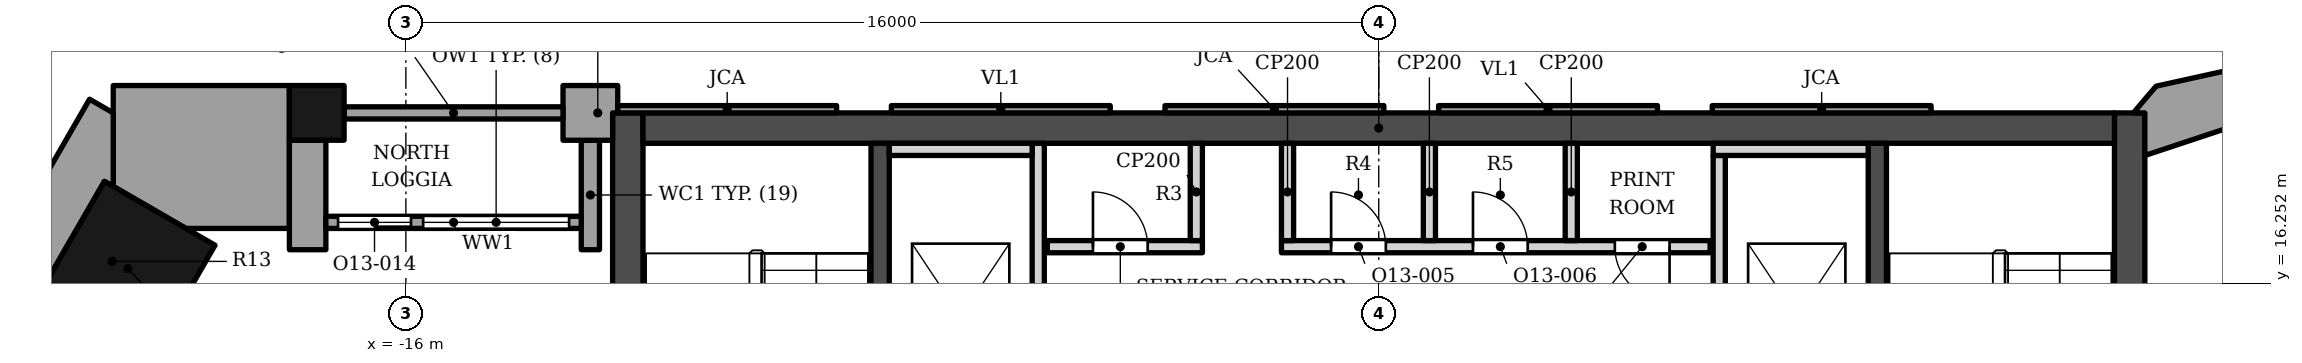
"""IFC4 building model, lengths in metres.
Left out: names, types, materials, properties, quantities, classifications, styles, units other than length and angle.
Written with IfcOpenShell. Run it as: python <this file> out.ifc"""

import sys

from ifc_helpers import new_model, si_unit, direction, frame, frame_2d, origin, origin_2d, place, context, subcontext, project, spatial, polyline, rectangle, outline, extrude, element, fill, save


model = new_model("IFC4")
c1 = context("Model", 3, precision=1e-05, world=origin(), true_north=direction((0.0, 1.0)))
c2 = subcontext(c1, "Body", "Model", "MODEL_VIEW")
j1 = project(units=[si_unit("LENGTHUNIT", "METRE"), si_unit("PLANEANGLEUNIT", "RADIAN")], contexts=[c1])
p1 = place(None, origin())
s1 = spatial("IfcSite", under=j1, at=p1, CompositionType="ELEMENT")
p2 = place(p1, origin())
s2 = spatial("IfcBuilding", under=s1, at=p2, CompositionType="ELEMENT")
p3 = place(p2, frame((0.0, 0.0, 287.2)))
s3 = spatial("IfcBuildingStorey", under=s2, at=p3, CompositionType="ELEMENT", Elevation=287.2)
p4 = place(p3, frame((-12.1, 18.802, 0.0), z_axis=(0.0, 0.0, 1.0), x_axis=(1.0, 0.0, 0.0)))
e1 = element("IfcWall", 1, at=p4, inside=s3, PredefinedType="SHEAR", context=c2, shape_type="SweptSolid", body=[
    extrude(rectangle(XDim=24.2, YDim=0.5, at=frame_2d((12.1, 0.0))), origin(), (0.0, 0.0, 1.0), 3.9),
])
p5 = place(p3, frame((-12.35, 5.253, 0.0), z_axis=(0.0, 0.0, 1.0), x_axis=(0.0, 1.0, 0.0)))
e2 = element("IfcWall", 2, at=p5, inside=s3, PredefinedType="SHEAR", context=c2, shape_type="SweptSolid", body=[
    extrude(rectangle(XDim=13.8, YDim=0.5, at=frame_2d((6.9, 0.0))), origin(), (0.0, 0.0, 1.0), 3.9),
])
p6 = place(p3, frame((-8.2, 5.253, 0.0), z_axis=(0.0, 0.0, 1.0), x_axis=(0.0, 1.0, 0.0)))
e3 = element("IfcWall", 3, at=p6, inside=s3, PredefinedType="SHEAR", context=c2, shape_type="SweptSolid", body=[
    extrude(rectangle(XDim=13.3, YDim=0.3, at=frame_2d((6.65, 0.0))), origin(), (0.0, 0.0, 1.0), 3.9),
])
p7 = place(p6, frame((7.1, 0.0, 0.0)))
e4 = element("IfcOpeningElement", 4, at=p7, cuts=e3, PredefinedType="OPENING", context=c2, shape_type="SweptSolid", body=[
    extrude(rectangle(XDim=1.4, YDim=2.1, at=frame_2d((0.7, 1.05))), frame((0.0, 0.16, 0.0), z_axis=(0.0, -1.0, 0.0), x_axis=(1.0, 0.0, 0.0)), (0.0, 0.0, 1.0), 0.32),
])
p8 = place(p6, frame((5.05, 0.0, 0.0)))
e5 = element("IfcOpeningElement", 5, at=p8, cuts=e3, PredefinedType="OPENING", context=c2, shape_type="SweptSolid", body=[
    extrude(rectangle(XDim=1.4, YDim=2.1, at=frame_2d((0.7, 1.05))), frame((0.0, 0.16, 0.0), z_axis=(0.0, -1.0, 0.0), x_axis=(1.0, 0.0, 0.0)), (0.0, 0.0, 1.0), 0.32),
])
p9 = place(p3, frame((12.35, 5.253, 0.0), z_axis=(0.0, 0.0, 1.0), x_axis=(0.0, 1.0, 0.0)))
e6 = element("IfcWall", 6, at=p9, inside=s3, PredefinedType="SHEAR", context=c2, shape_type="SweptSolid", body=[
    extrude(rectangle(XDim=13.8, YDim=0.5, at=frame_2d((6.9, 0.0))), origin(), (0.0, 0.0, 1.0), 3.9),
])
p10 = place(p3, frame((8.2, 5.253, 0.0), z_axis=(0.0, 0.0, 1.0), x_axis=(0.0, 1.0, 0.0)))
e7 = element("IfcWall", 7, at=p10, inside=s3, PredefinedType="SHEAR", context=c2, shape_type="SweptSolid", body=[
    extrude(rectangle(XDim=13.3, YDim=0.3, at=frame_2d((6.65, 0.0))), origin(), (0.0, 0.0, 1.0), 3.9),
])
p11 = place(p10, frame((7.1, 0.0, 0.0)))
e8 = element("IfcOpeningElement", 8, at=p11, cuts=e7, PredefinedType="OPENING", context=c2, shape_type="SweptSolid", body=[
    extrude(rectangle(XDim=1.4, YDim=2.1, at=frame_2d((0.7, 1.05))), frame((0.0, 0.16, 0.0), z_axis=(0.0, -1.0, 0.0), x_axis=(1.0, 0.0, 0.0)), (0.0, 0.0, 1.0), 0.32),
])
p12 = place(p10, frame((5.05, 0.0, 0.0)))
e9 = element("IfcOpeningElement", 9, at=p12, cuts=e7, PredefinedType="OPENING", context=c2, shape_type="SweptSolid", body=[
    extrude(rectangle(XDim=1.4, YDim=2.1, at=frame_2d((0.7, 1.05))), frame((0.0, 0.16, 0.0), z_axis=(0.0, -1.0, 0.0), x_axis=(1.0, 0.0, 0.0)), (0.0, 0.0, 1.0), 0.32),
])
p13 = place(p3, frame((-20.573, 16.492, 0.0), z_axis=(0.0, 0.0, 1.0), x_axis=(0.866025395058, -0.500000015115, 0.0)))
e10 = element("IfcColumn", 10, at=p13, inside=s3, PredefinedType="COLUMN", context=c2, shape_type="SweptSolid", body=[
    extrude(rectangle(XDim=2.1, YDim=2.1, at=origin_2d()), origin(), (0.0, 0.0, 1.0), 3.9),
])
p14 = place(p3, frame((-17.466, 19.053, 0.0), z_axis=(0.0, 0.0, 1.0), x_axis=(-1.0, 0.0, 0.0)))
e11 = element("IfcColumn", 11, at=p14, inside=s3, PredefinedType="COLUMN", context=c2, shape_type="SweptSolid", body=[
    extrude(rectangle(XDim=0.9, YDim=0.9, at=origin_2d()), origin(), (0.0, 0.0, 1.0), 3.9),
])
p15 = place(p3, origin())
e12 = element("IfcWall", 12, at=p15, inside=s3, PredefinedType="SOLIDWALL", context=c2, shape_type="SweptSolid", body=[
    extrude(outline(polyline([(-12.516, 19.052), (-12.516, 19.502), (-13.416, 19.502), (-13.416, 18.603), (-12.6, 18.603), (-12.6, 19.052), (-12.516, 19.052)])), origin(), (0.0, 0.0, 1.0), 3.0),
])
p16 = place(p3, origin())
e13 = element("IfcWall", 13, at=p16, inside=s3, PredefinedType="SOLIDWALL", context=c2, shape_type="SweptSolid", body=[
    extrude(outline(polyline([(-12.816, 16.802), (-12.816, 18.603), (-13.116, 18.603), (-13.116, 16.802), (-12.816, 16.802)])), origin(), (0.0, 0.0, 1.0), 3.0),
])
p17 = place(p3, origin())
e14 = element("IfcWall", 14, at=p17, inside=s3, PredefinedType="SOLIDWALL", context=c2, shape_type="SweptSolid", body=[
    extrude(outline(polyline([(-17.916, 18.603), (-17.916, 16.802), (-17.316, 16.802), (-17.316, 18.603), (-17.916, 18.603)])), origin(), (0.0, 0.0, 1.0), 3.0),
])
p18 = place(p3, origin())
e15 = element("IfcWall", 15, at=p18, inside=s3, PredefinedType="SOLIDWALL", context=c2, shape_type="SweptSolid", body=[
    extrude(outline(polyline([(5.484, 19.173), (5.484, 19.052), (9.084, 19.052), (9.084, 19.173), (5.484, 19.173)])), origin(), (0.0, 0.0, 1.0), 3.0),
])
p19 = place(p3, origin())
e16 = element("IfcWall", 16, at=p19, inside=s3, PredefinedType="ELEMENTEDWALL", context=c2, shape_type="SweptSolid", body=[
    extrude(outline(polyline([(0.984, 19.173), (0.984, 19.052), (4.584, 19.052), (4.584, 19.173), (0.984, 19.173)])), origin(), (0.0, 0.0, 1.0), 3.0),
])
p20 = place(p3, origin())
e17 = element("IfcWall", 17, at=p20, inside=s3, PredefinedType="SOLIDWALL", context=c2, shape_type="SweptSolid", body=[
    extrude(outline(polyline([(-3.516, 19.173), (-3.516, 19.052), (0.084, 19.052), (0.084, 19.173), (-3.516, 19.173)])), origin(), (0.0, 0.0, 1.0), 3.0),
])
p21 = place(p3, origin())
e18 = element("IfcWall", 18, at=p21, inside=s3, PredefinedType="ELEMENTEDWALL", context=c2, shape_type="SweptSolid", body=[
    extrude(outline(polyline([(-8.016, 19.173), (-8.016, 19.052), (-4.416, 19.052), (-4.416, 19.173), (-8.016, 19.173)])), origin(), (0.0, 0.0, 1.0), 3.0),
])
p22 = place(p3, origin())
e19 = element("IfcWall", 19, at=p22, inside=s3, PredefinedType="SOLIDWALL", context=c2, shape_type="SweptSolid", body=[
    extrude(outline(polyline([(-12.515, 19.173), (-12.515, 19.052), (-8.916, 19.052), (-8.916, 19.173), (-12.515, 19.173)])), origin(), (0.0, 0.0, 1.0), 3.0),
])
p23 = place(p3, frame((-13.416, 19.052, 0.0), z_axis=(0.0, 0.0, 1.0), x_axis=(-1.0, 0.0, 0.0)))
e20 = element("IfcWall", 20, at=p23, inside=s3, PredefinedType="SOLIDWALL", context=c2, shape_type="SweptSolid", body=[
    extrude(rectangle(XDim=3.6, YDim=0.2, at=frame_2d((1.8, 0.0))), origin(), (0.0, 0.0, 1.0), 3.0),
])
p24 = place(p3, frame((-13.116, 17.252, 0.0), z_axis=(0.0, 0.0, 1.0), x_axis=(-1.0, 0.0, 0.0)))
e21 = element("IfcWall", 21, at=p24, inside=s3, PredefinedType="ELEMENTEDWALL", context=c2, shape_type="SweptSolid", body=[
    extrude(rectangle(XDim=4.2, YDim=0.2, at=frame_2d((2.1, 0.0))), origin(), (0.0, 0.0, 1.0), 3.0),
])
p25 = place(p24, frame((0.2, 0.0, 0.45)))
e22 = element("IfcOpeningElement", 22, at=p25, cuts=e21, PredefinedType="OPENING", context=c2, shape_type="SweptSolid", body=[
    extrude(rectangle(XDim=2.4, YDim=2.25, at=frame_2d((1.2, 1.125))), frame((0.0, 0.11, 0.0), z_axis=(0.0, -1.0, 0.0), x_axis=(1.0, 0.0, 0.0)), (0.0, 0.0, 1.0), 0.22),
])
p26 = place(p24, frame((2.8, 0.0, 0.0)))
e23 = element("IfcOpeningElement", 23, at=p26, cuts=e21, PredefinedType="OPENING", context=c2, shape_type="SweptSolid", body=[
    extrude(rectangle(XDim=1.2, YDim=2.7, at=frame_2d((0.6, 1.35))), frame((0.0, 0.11, 0.0), z_axis=(0.0, -1.0, 0.0), x_axis=(1.0, 0.0, 0.0)), (0.0, 0.0, 1.0), 0.22),
])
p27 = place(p3, origin())
e24 = element("IfcWall", 24, at=p27, inside=s3, PredefinedType="SOLIDWALL", context=c2, shape_type="SweptSolid", body=[
    extrude(outline(polyline([(-19.617, 17.153), (-17.916, 17.153), (-17.916, 18.603), (-17.916, 18.603), (-17.916, 19.502), (-20.813, 19.502), (-20.813, 17.843), (-19.617, 17.153)])), origin(), (0.0, 0.0, 1.0), 3.0),
])
p28 = place(p3, origin())
e25 = element("IfcWall", 25, at=p28, inside=s3, PredefinedType="SOLIDWALL", context=c2, shape_type="SweptSolid", body=[
    extrude(outline(polyline([(-20.957, 17.926), (-20.813, 17.843), (-20.813, 19.052), (-21.202, 19.278), (-23.301, 15.643), (-21.863, 14.812), (-20.813, 15.418), (-22.007, 16.108), (-20.957, 17.926)])), origin(), (0.0, 0.0, 1.0), 3.0),
])
p29 = place(p3, origin())
e26 = element("IfcWall", 26, at=p29, inside=s3, PredefinedType="SOLIDWALL", context=c2, shape_type="SweptSolid", body=[
    extrude(outline(polyline([(14.201, 18.883), (14.008, 19.762), (12.784, 19.492), (12.41, 19.052), (12.6, 19.052), (12.6, 18.352), (14.201, 18.883)])), origin(), (0.0, 0.0, 1.0), 3.0),
])
p30 = place(p3, frame((-5.6, 14.253, 0.0), z_axis=(0.0, 0.0, 1.0), x_axis=(0.0, 1.0, 0.0)))
e27 = element("IfcWall", 27, at=p30, inside=s3, PredefinedType="SOLIDWALL", context=c2, shape_type="SweptSolid", body=[
    extrude(rectangle(XDim=4.3, YDim=0.2, at=frame_2d((2.15, 0.0))), origin(), (0.0, 0.0, 1.0), 3.73),
])
p31 = place(p3, frame((5.6, 15.453, 0.0), z_axis=(0.0, 0.0, 1.0), x_axis=(0.0, 1.0, 0.0)))
e28 = element("IfcWall", 28, at=p31, inside=s3, PredefinedType="SOLIDWALL", context=c2, shape_type="SweptSolid", body=[
    extrude(rectangle(XDim=2.9, YDim=0.2, at=frame_2d((1.45, 0.0))), origin(), (0.0, 0.0, 1.0), 3.73),
])
p32 = place(p3, frame((-5.45, 16.853, 0.0), z_axis=(0.0, 0.0, 1.0), x_axis=(1.0, 0.0, 0.0)))
e29 = element("IfcWall", 29, at=p32, inside=s3, PredefinedType="SOLIDWALL", context=c2, shape_type="SweptSolid", body=[
    extrude(rectangle(XDim=2.55, YDim=0.2, at=frame_2d((1.275, 0.0))), origin(), (0.0, 0.0, 1.0), 3.73),
])
p33 = place(p32, frame((0.75, 0.0, 0.0)))
e30 = element("IfcOpeningElement", 30, at=p33, cuts=e29, PredefinedType="OPENING", context=c2, shape_type="SweptSolid", body=[
    extrude(rectangle(XDim=0.9, YDim=2.1, at=frame_2d((0.45, 1.05))), frame((0.0, 0.11, 0.0), z_axis=(0.0, -1.0, 0.0), x_axis=(1.0, 0.0, 0.0)), (0.0, 0.0, 1.0), 0.22),
])
p34 = place(p3, frame((-1.6, 16.853, 0.0), z_axis=(0.0, 0.0, 1.0), x_axis=(1.0, 0.0, 0.0)))
e31 = element("IfcWall", 31, at=p34, inside=s3, PredefinedType="SOLIDWALL", context=c2, shape_type="SweptSolid", body=[
    extrude(rectangle(XDim=7.05, YDim=0.2, at=frame_2d((3.525, 0.0))), origin(), (0.0, 0.0, 1.0), 3.73),
])
p35 = place(p34, frame((0.817, 0.0, 0.0)))
e32 = element("IfcOpeningElement", 32, at=p35, cuts=e31, PredefinedType="OPENING", context=c2, shape_type="SweptSolid", body=[
    extrude(rectangle(XDim=0.9, YDim=2.1, at=frame_2d((0.45, 1.05))), frame((0.0, 0.11, 0.0), z_axis=(0.0, -1.0, 0.0), x_axis=(1.0, 0.0, 0.0)), (0.0, 0.0, 1.0), 0.22),
])
p36 = place(p34, frame((3.15, 0.0, 0.0)))
e33 = element("IfcOpeningElement", 33, at=p36, cuts=e31, PredefinedType="OPENING", context=c2, shape_type="SweptSolid", body=[
    extrude(rectangle(XDim=0.9, YDim=2.1, at=frame_2d((0.45, 1.05))), frame((0.0, 0.11, 0.0), z_axis=(0.0, -1.0, 0.0), x_axis=(1.0, 0.0, 0.0)), (0.0, 0.0, 1.0), 0.22),
])
p37 = place(p34, frame((5.483, 0.0, 0.0)))
e34 = element("IfcOpeningElement", 34, at=p37, cuts=e31, PredefinedType="OPENING", context=c2, shape_type="SweptSolid", body=[
    extrude(rectangle(XDim=0.9, YDim=2.1, at=frame_2d((0.45, 1.05))), frame((0.0, 0.11, 0.0), z_axis=(0.0, -1.0, 0.0), x_axis=(1.0, 0.0, 0.0)), (0.0, 0.0, 1.0), 0.22),
])
for number, where, z_axis, x_axis in (
    (35, (-3.0, 16.953, 0.0), (0.0, 0.0, 1.0), (0.0, 1.0, 0.0)),
    (36, (-1.5, 16.953, 0.0), (0.0, 0.0, 1.0), (0.0, 1.0, 0.0)),
    (37, (0.833, 16.953, 0.0), (0.0, 0.0, 1.0), (0.0, 1.0, 0.0)),
    (38, (3.167, 16.953, 0.0), (0.0, 0.0, 1.0), (0.0, 1.0, 0.0)),
):
    element("IfcWall", number, at=place(p3, frame(where, z_axis=z_axis, x_axis=x_axis)), inside=s3, PredefinedType="PARTITIONING", context=c2, shape_type="SweptSolid", body=[
        extrude(rectangle(XDim=1.6, YDim=0.2, at=frame_2d((0.8, 0.0))), origin(), (0.0, 0.0, 1.0), 3.73),
    ])
p38 = place(p3, frame((-8.05, 18.453, 0.0), z_axis=(0.0, 0.0, 1.0), x_axis=(1.0, 0.0, 0.0)))
e39 = element("IfcWall", 39, at=p38, inside=s3, PredefinedType="SOLIDWALL", context=c2, shape_type="SweptSolid", body=[
    extrude(rectangle(XDim=2.35, YDim=0.2, at=frame_2d((1.175, 0.0))), origin(), (0.0, 0.0, 1.0), 3.73),
])
p39 = place(p3, frame((5.5, 18.453, 0.0), z_axis=(0.0, 0.0, 1.0), x_axis=(1.0, 0.0, 0.0)))
e40 = element("IfcWall", 40, at=p39, inside=s3, PredefinedType="SOLIDWALL", context=c2, shape_type="SweptSolid", body=[
    extrude(rectangle(XDim=2.55, YDim=0.2, at=frame_2d((1.275, 0.0))), origin(), (0.0, 0.0, 1.0), 3.73),
])
p40 = place(p25, origin())
e41 = element("IfcWindow", 41, at=p40, inside=s3, PartitioningType="SINGLE_PANEL", PredefinedType="WINDOW", context=c2, shape_type="SweptSolid", body=[
    extrude(rectangle(XDim=2.4, YDim=2.25, at=frame_2d((1.2, 1.125))), frame((0.0, 0.03, 0.0), z_axis=(0.0, -1.0, 0.0), x_axis=(1.0, 0.0, 0.0)), (0.0, 0.0, 1.0), 0.06),
])
fill(e22, e41)
p41 = place(p26, origin())
e42 = element("IfcDoor", 42, at=p41, inside=s3, OperationType="SINGLE_SWING_LEFT", PredefinedType="DOOR", context=c2, shape_type="SweptSolid", body=[
    extrude(rectangle(XDim=1.2, YDim=2.7, at=frame_2d((0.6, 1.35))), frame((0.0, 0.025, 0.0), z_axis=(0.0, -1.0, 0.0), x_axis=(1.0, 0.0, 0.0)), (0.0, 0.0, 1.0), 0.05),
])
fill(e23, e42)
p42 = place(p33, origin())
e43 = element("IfcDoor", 43, at=p42, inside=s3, OperationType="SINGLE_SWING_LEFT", PredefinedType="DOOR", context=c2, shape_type="SweptSolid", body=[
    extrude(rectangle(XDim=0.9, YDim=2.1, at=frame_2d((0.45, 1.05))), frame((0.0, 0.025, 0.0), z_axis=(0.0, -1.0, 0.0), x_axis=(1.0, 0.0, 0.0)), (0.0, 0.0, 1.0), 0.05),
])
fill(e30, e43)
p43 = place(p35, origin())
e44 = element("IfcDoor", 44, at=p43, inside=s3, OperationType="SINGLE_SWING_LEFT", PredefinedType="DOOR", context=c2, shape_type="SweptSolid", body=[
    extrude(rectangle(XDim=0.9, YDim=2.1, at=frame_2d((0.45, 1.05))), frame((0.0, 0.025, 0.0), z_axis=(0.0, -1.0, 0.0), x_axis=(1.0, 0.0, 0.0)), (0.0, 0.0, 1.0), 0.05),
])
fill(e32, e44)
p44 = place(p36, origin())
e45 = element("IfcDoor", 45, at=p44, inside=s3, OperationType="SINGLE_SWING_LEFT", PredefinedType="DOOR", context=c2, shape_type="SweptSolid", body=[
    extrude(rectangle(XDim=0.9, YDim=2.1, at=frame_2d((0.45, 1.05))), frame((0.0, 0.025, 0.0), z_axis=(0.0, -1.0, 0.0), x_axis=(1.0, 0.0, 0.0)), (0.0, 0.0, 1.0), 0.05),
])
fill(e33, e45)
p45 = place(p37, origin())
e46 = element("IfcDoor", 46, at=p45, inside=s3, OperationType="SINGLE_SWING_RIGHT", PredefinedType="DOOR", context=c2, shape_type="SweptSolid", body=[
    extrude(rectangle(XDim=0.9, YDim=2.1, at=frame_2d((0.45, 1.05))), frame((0.0, 0.025, 0.0), z_axis=(0.0, -1.0, 0.0), x_axis=(1.0, 0.0, 0.0)), (0.0, 0.0, 1.0), 0.05),
])
fill(e34, e46)
save(model, sys.argv[1])
